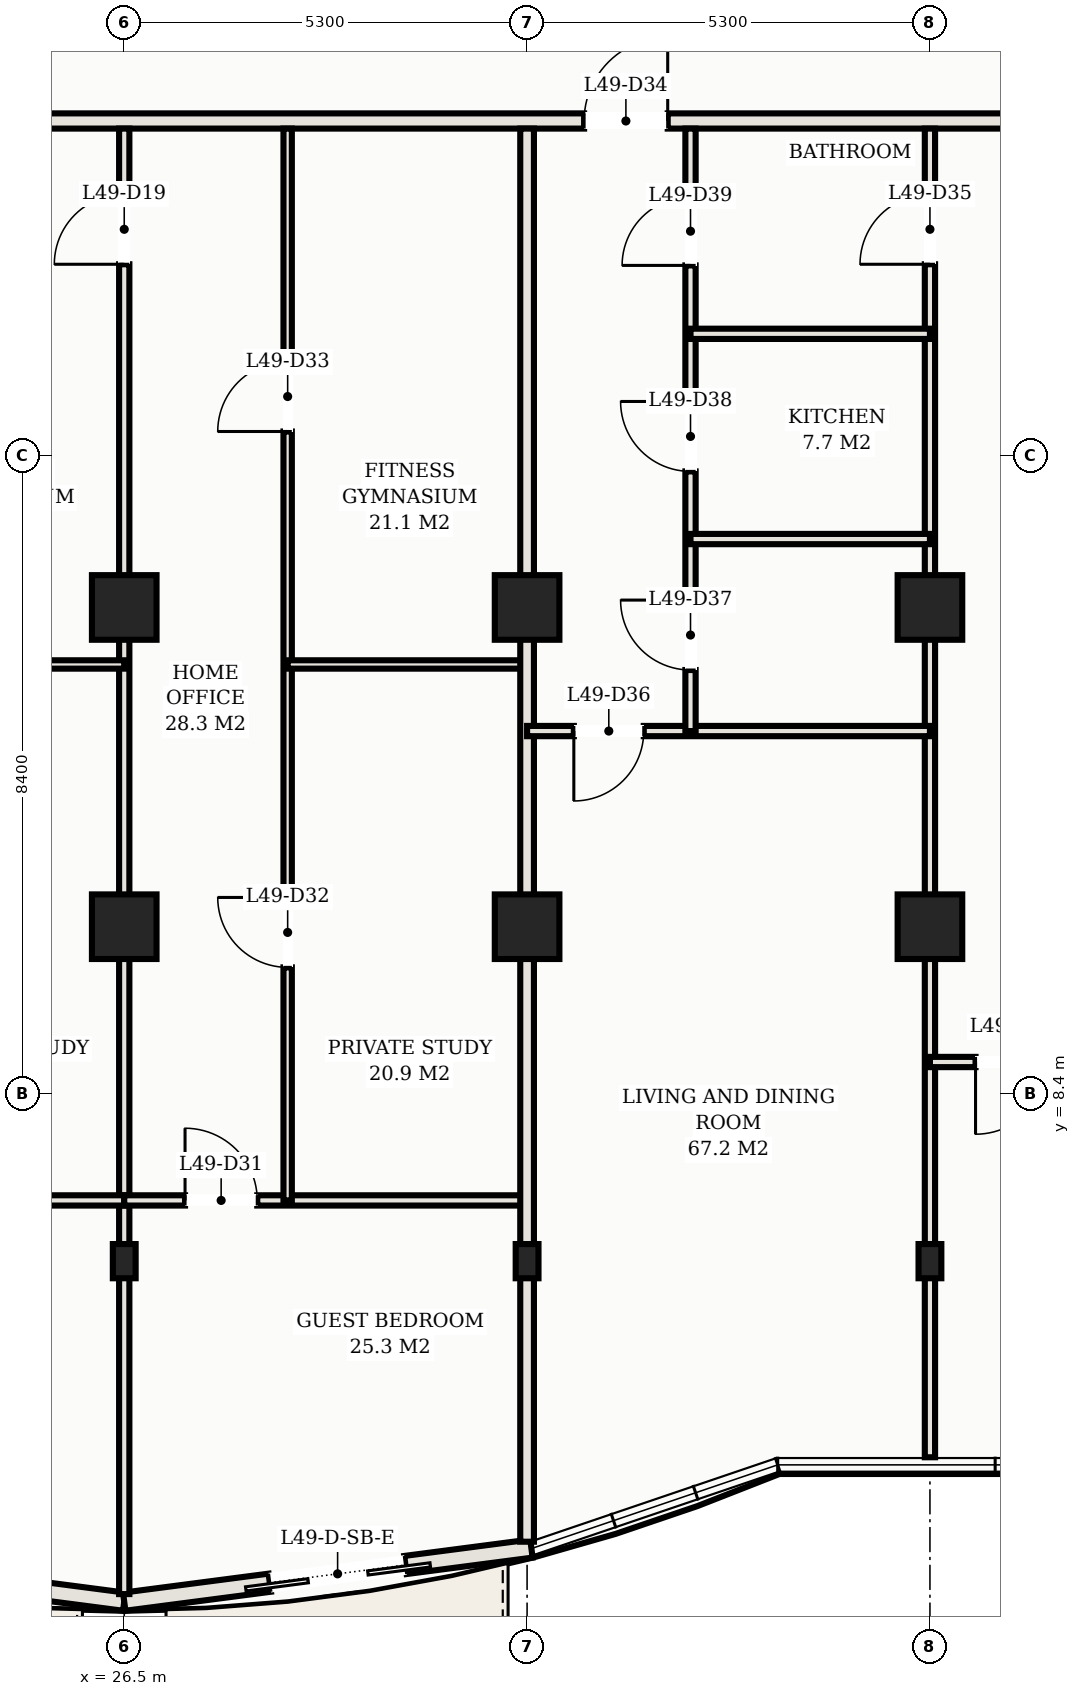
"""IFC4 building model, lengths in metres.
Left out: names, types, materials, properties, quantities, classifications, styles, units other than length and angle.
Written with IfcOpenShell. Run it as: python <this file> out.ifc"""

import sys

from ifc_helpers import new_model, si_unit, direction, frame, frame_2d, origin, origin_2d, place, context, subcontext, project, spatial, rectangle, hollow_rectangle, extrude, element, fill, save


model = new_model("IFC4")
c1 = context("Model", 3, precision=1e-05, world=origin(), true_north=direction((0.0, 1.0)))
c2 = subcontext(c1, "Body", "Model", "MODEL_VIEW")
j1 = project(units=[si_unit("LENGTHUNIT", "METRE"), si_unit("PLANEANGLEUNIT", "RADIAN")], contexts=[c1])
p1 = place(None, origin())
s1 = spatial("IfcSite", under=j1, at=p1, CompositionType="ELEMENT")
p2 = place(p1, origin())
s2 = spatial("IfcBuilding", under=s1, at=p2, CompositionType="ELEMENT")
p3 = place(p2, frame((0.0, 0.0, 178.8)))
s3 = spatial("IfcBuildingStorey", under=s2, at=p3, CompositionType="ELEMENT", Elevation=178.8)
for number, where, z_axis, x_axis in (
    (1, (26.5, 14.8, 0.0), (0.0, 0.0, 1.0), (1.0, 0.0, 0.0)),
    (2, (26.5, 10.6, 0.0), (0.0, 0.0, 1.0), (1.0, 0.0, 0.0)),
    (3, (31.8, 14.8, 0.0), (0.0, 0.0, 1.0), (1.0, 0.0, 0.0)),
    (4, (31.8, 10.6, 0.0), (0.0, 0.0, 1.0), (1.0, 0.0, 0.0)),
    (5, (37.1, 14.8, 0.0), (0.0, 0.0, 1.0), (1.0, 0.0, 0.0)),
    (6, (37.1, 10.6, 0.0), (0.0, 0.0, 1.0), (1.0, 0.0, 0.0)),
):
    element("IfcColumn", number, at=place(p3, frame(where, z_axis=z_axis, x_axis=x_axis)), inside=s3, PredefinedType="COLUMN", context=c2, shape_type="SweptSolid", body=[
        extrude(hollow_rectangle(XDim=0.85, YDim=0.85, WallThickness=0.028, at=origin_2d()), origin(), (0.0, 0.0, 1.0), 3.3),
    ])
for number, where, z_axis, x_axis in (
    (7, (26.5, 6.2, 0.0), (0.0, 0.0, 1.0), (1.0, 0.0, 0.0)),
    (8, (31.8, 6.2, 0.0), (0.0, 0.0, 1.0), (1.0, 0.0, 0.0)),
    (9, (37.1, 6.2, 0.0), (0.0, 0.0, 1.0), (1.0, 0.0, 0.0)),
):
    element("IfcColumn", number, at=place(p3, frame(where, z_axis=z_axis, x_axis=x_axis)), inside=s3, PredefinedType="COLUMN", context=c2, shape_type="SweptSolid", body=[
        extrude(hollow_rectangle(XDim=0.3, YDim=0.45, WallThickness=0.016, at=origin_2d()), origin(), (0.0, 0.0, 1.0), 3.3),
    ])
p4 = place(p3, frame((21.142, 2.419, 0.0), z_axis=(0.0, 0.0, 1.0), x_axis=(0.991597639478, -0.129360432053, 0.0)))
e10 = element("IfcWall", 10, at=p4, inside=s3, PredefinedType="SOLIDWALL", context=c2, shape_type="SweptSolid", body=[
    extrude(rectangle(XDim=5.403, YDim=0.24, at=frame_2d((2.702, 0.0))), origin(), (0.0, 0.0, 1.0), 3.1),
])
p5 = place(p4, frame((1.672, 0.0, 0.0)))
e11 = element("IfcOpeningElement", 11, at=p5, cuts=e10, PredefinedType="OPENING", context=c2, shape_type="SweptSolid", body=[
    extrude(rectangle(XDim=1.8, YDim=2.2, at=frame_2d((0.9, 1.1))), frame((0.0, 0.13, 0.0), z_axis=(0.0, -1.0, 0.0), x_axis=(1.0, 0.0, 0.0)), (0.0, 0.0, 1.0), 0.26),
])
p6 = place(p3, frame((26.5, 1.72, 0.0), z_axis=(0.0, 0.0, 1.0), x_axis=(0.991594614239, 0.129383619568, 0.0)))
e12 = element("IfcWall", 12, at=p6, inside=s3, PredefinedType="SOLIDWALL", context=c2, shape_type="SweptSolid", body=[
    extrude(rectangle(XDim=5.402, YDim=0.24, at=frame_2d((2.701, 0.0))), origin(), (0.0, 0.0, 1.0), 3.1),
])
p7 = place(p6, frame((1.931, 0.0, 0.0)))
e13 = element("IfcOpeningElement", 13, at=p7, cuts=e12, PredefinedType="OPENING", context=c2, shape_type="SweptSolid", body=[
    extrude(rectangle(XDim=1.8, YDim=2.2, at=frame_2d((0.9, 1.1))), frame((0.0, 0.13, 0.0), z_axis=(0.0, -1.0, 0.0), x_axis=(1.0, 0.0, 0.0)), (0.0, 0.0, 1.0), 0.26),
])
p8 = place(p3, frame((4.32, 21.2, 0.0), z_axis=(0.0, 0.0, 1.0), x_axis=(1.0, 0.0, 0.0)))
e14 = element("IfcWall", 14, at=p8, inside=s3, PredefinedType="PARTITIONING", context=c2, shape_type="SweptSolid", body=[
    extrude(rectangle(XDim=44.36, YDim=0.2, at=frame_2d((22.18, 0.0))), origin(), (0.0, 0.0, 1.0), 2.38),
])
p9 = place(p8, frame((7.03, 0.0, 0.0)))
e15 = element("IfcOpeningElement", 15, at=p9, cuts=e14, PredefinedType="OPENING", context=c2, shape_type="SweptSolid", body=[
    extrude(rectangle(XDim=1.1, YDim=2.25, at=frame_2d((0.55, 1.125))), frame((0.0, 0.11, 0.0), z_axis=(0.0, -1.0, 0.0), x_axis=(1.0, 0.0, 0.0)), (0.0, 0.0, 1.0), 0.22),
])
p10 = place(p8, frame((28.23, 0.0, 0.0)))
e16 = element("IfcOpeningElement", 16, at=p10, cuts=e14, PredefinedType="OPENING", context=c2, shape_type="SweptSolid", body=[
    extrude(rectangle(XDim=1.1, YDim=2.25, at=frame_2d((0.55, 1.125))), frame((0.0, 0.11, 0.0), z_axis=(0.0, -1.0, 0.0), x_axis=(1.0, 0.0, 0.0)), (0.0, 0.0, 1.0), 0.22),
])
p11 = place(p8, frame((2.635, 0.0, 0.0)))
e17 = element("IfcOpeningElement", 17, at=p11, cuts=e14, PredefinedType="OPENING", context=c2, shape_type="SweptSolid", body=[
    extrude(rectangle(XDim=0.92, YDim=2.15, at=frame_2d((0.46, 1.075))), frame((0.0, 0.11, 0.0), z_axis=(0.0, -1.0, 0.0), x_axis=(1.0, 0.0, 0.0)), (0.0, 0.0, 1.0), 0.22),
])
p12 = place(p8, frame((40.805, 0.0, 0.0)))
e18 = element("IfcOpeningElement", 18, at=p12, cuts=e14, PredefinedType="OPENING", context=c2, shape_type="SweptSolid", body=[
    extrude(rectangle(XDim=0.92, YDim=2.15, at=frame_2d((0.46, 1.075))), frame((0.0, 0.11, 0.0), z_axis=(0.0, -1.0, 0.0), x_axis=(1.0, 0.0, 0.0)), (0.0, 0.0, 1.0), 0.22),
])
p13 = place(p3, frame((26.5, 1.82, 0.0), z_axis=(0.0, 0.0, 1.0), x_axis=(0.0, 1.0, 0.0)))
e19 = element("IfcWall", 19, at=p13, inside=s3, PredefinedType="PARTITIONING", context=c2, shape_type="SweptSolid", body=[
    extrude(rectangle(XDim=19.28, YDim=0.135, at=frame_2d((9.64, 0.0))), origin(), (0.0, 0.0, 1.0), 2.38),
])
p14 = place(p13, frame((17.495, 0.0, 0.0)))
e20 = element("IfcOpeningElement", 20, at=p14, cuts=e19, PredefinedType="OPENING", context=c2, shape_type="SweptSolid", body=[
    extrude(rectangle(XDim=0.92, YDim=2.15, at=frame_2d((0.46, 1.075))), frame((0.0, 0.078, 0.0), z_axis=(0.0, -1.0, 0.0), x_axis=(1.0, 0.0, 0.0)), (0.0, 0.0, 1.0), 0.155),
])
p15 = place(p3, frame((21.2, 6.999, 0.0), z_axis=(0.0, 0.0, 1.0), x_axis=(1.0, 0.0, 0.0)))
e21 = element("IfcWall", 21, at=p15, inside=s3, PredefinedType="PARTITIONING", context=c2, shape_type="SweptSolid", body=[
    extrude(rectangle(XDim=5.3, YDim=0.135, at=frame_2d((2.65, 0.0))), origin(), (0.0, 0.0, 1.0), 2.38),
])
p16 = place(p15, frame((0.8, 0.0, 0.0)))
e22 = element("IfcOpeningElement", 22, at=p16, cuts=e21, PredefinedType="OPENING", context=c2, shape_type="SweptSolid", body=[
    extrude(rectangle(XDim=0.95, YDim=2.15, at=frame_2d((0.475, 1.075))), frame((0.0, 0.078, 0.0), z_axis=(0.0, -1.0, 0.0), x_axis=(1.0, 0.0, 0.0)), (0.0, 0.0, 1.0), 0.155),
])
p17 = place(p3, frame((23.35, 14.05, 0.0), z_axis=(0.0, 0.0, 1.0), x_axis=(1.0, 0.0, 0.0)))
e23 = element("IfcWall", 23, at=p17, inside=s3, PredefinedType="MOVABLE", context=c2, shape_type="SweptSolid", body=[
    extrude(rectangle(XDim=3.15, YDim=0.11, at=frame_2d((1.575, 0.0))), origin(), (0.0, 0.0, 1.0), 2.38),
])
p18 = place(p3, frame((26.5, 6.999, 0.0), z_axis=(0.0, 0.0, 1.0), x_axis=(1.0, 0.0, 0.0)))
e24 = element("IfcWall", 24, at=p18, inside=s3, PredefinedType="PARTITIONING", context=c2, shape_type="SweptSolid", body=[
    extrude(rectangle(XDim=5.3, YDim=0.135, at=frame_2d((2.65, 0.0))), origin(), (0.0, 0.0, 1.0), 2.38),
])
p19 = place(p18, frame((0.8, 0.0, 0.0)))
e25 = element("IfcOpeningElement", 25, at=p19, cuts=e24, PredefinedType="OPENING", context=c2, shape_type="SweptSolid", body=[
    extrude(rectangle(XDim=0.95, YDim=2.15, at=frame_2d((0.475, 1.075))), frame((0.0, 0.078, 0.0), z_axis=(0.0, -1.0, 0.0), x_axis=(1.0, 0.0, 0.0)), (0.0, 0.0, 1.0), 0.155),
])
p20 = place(p3, frame((28.65, 6.999, 0.0), z_axis=(0.0, 0.0, 1.0), x_axis=(0.0, 1.0, 0.0)))
e26 = element("IfcWall", 26, at=p20, inside=s3, PredefinedType="MOVABLE", context=c2, shape_type="SweptSolid", body=[
    extrude(rectangle(XDim=14.101, YDim=0.11, at=frame_2d((7.051, 0.0))), origin(), (0.0, 0.0, 1.0), 2.38),
])
p21 = place(p20, frame((3.066, 0.0, 0.0)))
e27 = element("IfcOpeningElement", 27, at=p21, cuts=e26, PredefinedType="OPENING", context=c2, shape_type="SweptSolid", body=[
    extrude(rectangle(XDim=0.92, YDim=2.15, at=frame_2d((0.46, 1.075))), frame((0.0, 0.065, 0.0), z_axis=(0.0, -1.0, 0.0), x_axis=(1.0, 0.0, 0.0)), (0.0, 0.0, 1.0), 0.13),
])
p22 = place(p20, frame((10.116, 0.0, 0.0)))
e28 = element("IfcOpeningElement", 28, at=p22, cuts=e26, PredefinedType="OPENING", context=c2, shape_type="SweptSolid", body=[
    extrude(rectangle(XDim=0.92, YDim=2.15, at=frame_2d((0.46, 1.075))), frame((0.0, 0.065, 0.0), z_axis=(0.0, -1.0, 0.0), x_axis=(1.0, 0.0, 0.0)), (0.0, 0.0, 1.0), 0.13),
])
p23 = place(p3, frame((28.65, 14.05, 0.0), z_axis=(0.0, 0.0, 1.0), x_axis=(1.0, 0.0, 0.0)))
e29 = element("IfcWall", 29, at=p23, inside=s3, PredefinedType="MOVABLE", context=c2, shape_type="SweptSolid", body=[
    extrude(rectangle(XDim=3.15, YDim=0.11, at=frame_2d((1.575, 0.0))), origin(), (0.0, 0.0, 1.0), 2.38),
])
p24 = place(p3, frame((31.8, 2.509, 0.0), z_axis=(0.0, 0.0, 1.0), x_axis=(0.0, 1.0, 0.0)))
e30 = element("IfcWall", 30, at=p24, inside=s3, PredefinedType="PARTITIONING", context=c2, shape_type="SweptSolid", body=[
    extrude(rectangle(XDim=18.591, YDim=0.18, at=frame_2d((9.295, 0.0))), origin(), (0.0, 0.0, 1.0), 2.38),
])
p25 = place(p3, frame((37.1, 3.62, 0.0), z_axis=(0.0, 0.0, 1.0), x_axis=(0.0, 1.0, 0.0)))
e31 = element("IfcWall", 31, at=p25, inside=s3, PredefinedType="PARTITIONING", context=c2, shape_type="SweptSolid", body=[
    extrude(rectangle(XDim=17.48, YDim=0.135, at=frame_2d((8.74, 0.0))), origin(), (0.0, 0.0, 1.0), 2.38),
])
p26 = place(p25, frame((15.695, 0.0, 0.0)))
e32 = element("IfcOpeningElement", 32, at=p26, cuts=e31, PredefinedType="OPENING", context=c2, shape_type="SweptSolid", body=[
    extrude(rectangle(XDim=0.92, YDim=2.15, at=frame_2d((0.46, 1.075))), frame((0.0, 0.078, 0.0), z_axis=(0.0, -1.0, 0.0), x_axis=(1.0, 0.0, 0.0)), (0.0, 0.0, 1.0), 0.155),
])
p27 = place(p3, frame((31.8, 13.174, 0.0), z_axis=(0.0, 0.0, 1.0), x_axis=(1.0, 0.0, 0.0)))
e33 = element("IfcWall", 33, at=p27, inside=s3, PredefinedType="PARTITIONING", context=c2, shape_type="SweptSolid", body=[
    extrude(rectangle(XDim=5.3, YDim=0.135, at=frame_2d((2.65, 0.0))), origin(), (0.0, 0.0, 1.0), 2.38),
])
p28 = place(p27, frame((0.615, 0.0, 0.0)))
e34 = element("IfcOpeningElement", 34, at=p28, cuts=e33, PredefinedType="OPENING", context=c2, shape_type="SweptSolid", body=[
    extrude(rectangle(XDim=0.92, YDim=2.15, at=frame_2d((0.46, 1.075))), frame((0.0, 0.078, 0.0), z_axis=(0.0, -1.0, 0.0), x_axis=(1.0, 0.0, 0.0)), (0.0, 0.0, 1.0), 0.155),
])
p29 = place(p3, frame((33.95, 13.174, 0.0), z_axis=(0.0, 0.0, 1.0), x_axis=(0.0, 1.0, 0.0)))
e35 = element("IfcWall", 35, at=p29, inside=s3, PredefinedType="PARTITIONING", context=c2, shape_type="SweptSolid", body=[
    extrude(rectangle(XDim=7.926, YDim=0.135, at=frame_2d((3.963, 0.0))), origin(), (0.0, 0.0, 1.0), 2.38),
])
p30 = place(p29, frame((0.803, 0.0, 0.0)))
e36 = element("IfcOpeningElement", 36, at=p30, cuts=e35, PredefinedType="OPENING", context=c2, shape_type="SweptSolid", body=[
    extrude(rectangle(XDim=0.92, YDim=2.15, at=frame_2d((0.46, 1.075))), frame((0.0, 0.078, 0.0), z_axis=(0.0, -1.0, 0.0), x_axis=(1.0, 0.0, 0.0)), (0.0, 0.0, 1.0), 0.155),
])
p31 = place(p29, frame((3.416, 0.0, 0.0)))
e37 = element("IfcOpeningElement", 37, at=p31, cuts=e35, PredefinedType="OPENING", context=c2, shape_type="SweptSolid", body=[
    extrude(rectangle(XDim=0.92, YDim=2.15, at=frame_2d((0.46, 1.075))), frame((0.0, 0.078, 0.0), z_axis=(0.0, -1.0, 0.0), x_axis=(1.0, 0.0, 0.0)), (0.0, 0.0, 1.0), 0.155),
])
p32 = place(p29, frame((6.126, 0.0, 0.0)))
e38 = element("IfcOpeningElement", 38, at=p32, cuts=e35, PredefinedType="OPENING", context=c2, shape_type="SweptSolid", body=[
    extrude(rectangle(XDim=0.9, YDim=2.15, at=frame_2d((0.45, 1.075))), frame((0.0, 0.078, 0.0), z_axis=(0.0, -1.0, 0.0), x_axis=(1.0, 0.0, 0.0)), (0.0, 0.0, 1.0), 0.155),
])
for number, where, z_axis, x_axis in (
    (39, (33.95, 15.7, 0.0), (0.0, 0.0, 1.0), (1.0, 0.0, 0.0)),
    (40, (33.95, 18.4, 0.0), (0.0, 0.0, 1.0), (1.0, 0.0, 0.0)),
):
    element("IfcWall", number, at=place(p3, frame(where, z_axis=z_axis, x_axis=x_axis)), inside=s3, PredefinedType="PARTITIONING", context=c2, shape_type="SweptSolid", body=[
        extrude(rectangle(XDim=3.15, YDim=0.135, at=frame_2d((1.575, 0.0))), origin(), (0.0, 0.0, 1.0), 2.38),
    ])
p33 = place(p3, frame((37.1, 8.82, 0.0), z_axis=(0.0, 0.0, 1.0), x_axis=(1.0, 0.0, 0.0)))
e41 = element("IfcWall", 41, at=p33, inside=s3, PredefinedType="PARTITIONING", context=c2, shape_type="SweptSolid", body=[
    extrude(rectangle(XDim=5.3, YDim=0.135, at=frame_2d((2.65, 0.0))), origin(), (0.0, 0.0, 1.0), 2.38),
])
p34 = place(p33, frame((0.6, 0.0, 0.0)))
e42 = element("IfcOpeningElement", 42, at=p34, cuts=e41, PredefinedType="OPENING", context=c2, shape_type="SweptSolid", body=[
    extrude(rectangle(XDim=0.95, YDim=2.15, at=frame_2d((0.475, 1.075))), frame((0.0, 0.078, 0.0), z_axis=(0.0, -1.0, 0.0), x_axis=(1.0, 0.0, 0.0)), (0.0, 0.0, 1.0), 0.155),
])
p35 = place(p33, frame((3.275, 0.0, 0.0)))
e43 = element("IfcOpeningElement", 43, at=p35, cuts=e41, PredefinedType="OPENING", context=c2, shape_type="SweptSolid", body=[
    extrude(rectangle(XDim=0.9, YDim=2.15, at=frame_2d((0.45, 1.075))), frame((0.0, 0.078, 0.0), z_axis=(0.0, -1.0, 0.0), x_axis=(1.0, 0.0, 0.0)), (0.0, 0.0, 1.0), 0.155),
])
p36 = place(p7, frame((1.8, 0.0, 0.0), z_axis=(0.0, 0.0, 1.0), x_axis=(-1.0, 0.0, 0.0)))
e44 = element("IfcDoor", 44, at=p36, inside=s3, OperationType="DOUBLE_DOOR_SLIDING", PredefinedType="DOOR", context=c2, shape_type="SweptSolid", body=[
    extrude(rectangle(XDim=1.8, YDim=2.2, at=frame_2d((0.9, 1.1))), frame((0.0, 0.025, 0.0), z_axis=(0.0, -1.0, 0.0), x_axis=(1.0, 0.0, 0.0)), (0.0, 0.0, 1.0), 0.05),
])
fill(e13, e44)
p37 = place(p14, origin())
e45 = element("IfcDoor", 45, at=p37, inside=s3, OperationType="SINGLE_SWING_LEFT", PredefinedType="DOOR", context=c2, shape_type="SweptSolid", body=[
    extrude(rectangle(XDim=0.92, YDim=2.15, at=frame_2d((0.46, 1.075))), frame((0.0, 0.025, 0.0), z_axis=(0.0, -1.0, 0.0), x_axis=(1.0, 0.0, 0.0)), (0.0, 0.0, 1.0), 0.05),
])
fill(e20, e45)
p38 = place(p19, origin())
e46 = element("IfcDoor", 46, at=p38, inside=s3, OperationType="SINGLE_SWING_LEFT", PredefinedType="DOOR", context=c2, shape_type="SweptSolid", body=[
    extrude(rectangle(XDim=0.95, YDim=2.15, at=frame_2d((0.475, 1.075))), frame((0.0, 0.025, 0.0), z_axis=(0.0, -1.0, 0.0), x_axis=(1.0, 0.0, 0.0)), (0.0, 0.0, 1.0), 0.05),
])
fill(e25, e46)
p39 = place(p21, origin())
e47 = element("IfcDoor", 47, at=p39, inside=s3, OperationType="SINGLE_SWING_RIGHT", PredefinedType="DOOR", context=c2, shape_type="SweptSolid", body=[
    extrude(rectangle(XDim=0.92, YDim=2.15, at=frame_2d((0.46, 1.075))), frame((0.0, 0.025, 0.0), z_axis=(0.0, -1.0, 0.0), x_axis=(1.0, 0.0, 0.0)), (0.0, 0.0, 1.0), 0.05),
])
fill(e27, e47)
p40 = place(p22, origin())
e48 = element("IfcDoor", 48, at=p40, inside=s3, OperationType="SINGLE_SWING_LEFT", PredefinedType="DOOR", context=c2, shape_type="SweptSolid", body=[
    extrude(rectangle(XDim=0.92, YDim=2.15, at=frame_2d((0.46, 1.075))), frame((0.0, 0.025, 0.0), z_axis=(0.0, -1.0, 0.0), x_axis=(1.0, 0.0, 0.0)), (0.0, 0.0, 1.0), 0.05),
])
fill(e28, e48)
p41 = place(p10, origin())
e49 = element("IfcDoor", 49, at=p41, inside=s3, OperationType="SINGLE_SWING_RIGHT", PredefinedType="DOOR", context=c2, shape_type="SweptSolid", body=[
    extrude(rectangle(XDim=1.1, YDim=2.25, at=frame_2d((0.55, 1.125))), frame((0.0, 0.025, 0.0), z_axis=(0.0, -1.0, 0.0), x_axis=(1.0, 0.0, 0.0)), (0.0, 0.0, 1.0), 0.05),
])
fill(e16, e49)
p42 = place(p26, origin())
e50 = element("IfcDoor", 50, at=p42, inside=s3, OperationType="SINGLE_SWING_LEFT", PredefinedType="DOOR", context=c2, shape_type="SweptSolid", body=[
    extrude(rectangle(XDim=0.92, YDim=2.15, at=frame_2d((0.46, 1.075))), frame((0.0, 0.025, 0.0), z_axis=(0.0, -1.0, 0.0), x_axis=(1.0, 0.0, 0.0)), (0.0, 0.0, 1.0), 0.05),
])
fill(e32, e50)
p43 = place(p28, frame((0.92, 0.0, 0.0), z_axis=(0.0, 0.0, 1.0), x_axis=(-1.0, 0.0, 0.0)))
e51 = element("IfcDoor", 51, at=p43, inside=s3, OperationType="SINGLE_SWING_RIGHT", PredefinedType="DOOR", context=c2, shape_type="SweptSolid", body=[
    extrude(rectangle(XDim=0.92, YDim=2.15, at=frame_2d((0.46, 1.075))), frame((0.0, 0.025, 0.0), z_axis=(0.0, -1.0, 0.0), x_axis=(1.0, 0.0, 0.0)), (0.0, 0.0, 1.0), 0.05),
])
fill(e34, e51)
p44 = place(p30, origin())
e52 = element("IfcDoor", 52, at=p44, inside=s3, OperationType="SINGLE_SWING_RIGHT", PredefinedType="DOOR", context=c2, shape_type="SweptSolid", body=[
    extrude(rectangle(XDim=0.92, YDim=2.15, at=frame_2d((0.46, 1.075))), frame((0.0, 0.025, 0.0), z_axis=(0.0, -1.0, 0.0), x_axis=(1.0, 0.0, 0.0)), (0.0, 0.0, 1.0), 0.05),
])
fill(e36, e52)
p45 = place(p31, origin())
e53 = element("IfcDoor", 53, at=p45, inside=s3, OperationType="SINGLE_SWING_RIGHT", PredefinedType="DOOR", context=c2, shape_type="SweptSolid", body=[
    extrude(rectangle(XDim=0.92, YDim=2.15, at=frame_2d((0.46, 1.075))), frame((0.0, 0.025, 0.0), z_axis=(0.0, -1.0, 0.0), x_axis=(1.0, 0.0, 0.0)), (0.0, 0.0, 1.0), 0.05),
])
fill(e37, e53)
p46 = place(p32, origin())
e54 = element("IfcDoor", 54, at=p46, inside=s3, OperationType="SINGLE_SWING_LEFT", PredefinedType="DOOR", context=c2, shape_type="SweptSolid", body=[
    extrude(rectangle(XDim=0.9, YDim=2.15, at=frame_2d((0.45, 1.075))), frame((0.0, 0.025, 0.0), z_axis=(0.0, -1.0, 0.0), x_axis=(1.0, 0.0, 0.0)), (0.0, 0.0, 1.0), 0.05),
])
fill(e38, e54)
p47 = place(p34, frame((0.95, 0.0, 0.0), z_axis=(0.0, 0.0, 1.0), x_axis=(-1.0, 0.0, 0.0)))
e55 = element("IfcDoor", 55, at=p47, inside=s3, OperationType="SINGLE_SWING_RIGHT", PredefinedType="DOOR", context=c2, shape_type="SweptSolid", body=[
    extrude(rectangle(XDim=0.95, YDim=2.15, at=frame_2d((0.475, 1.075))), frame((0.0, 0.025, 0.0), z_axis=(0.0, -1.0, 0.0), x_axis=(1.0, 0.0, 0.0)), (0.0, 0.0, 1.0), 0.05),
])
fill(e42, e55)
save(model, sys.argv[1])
